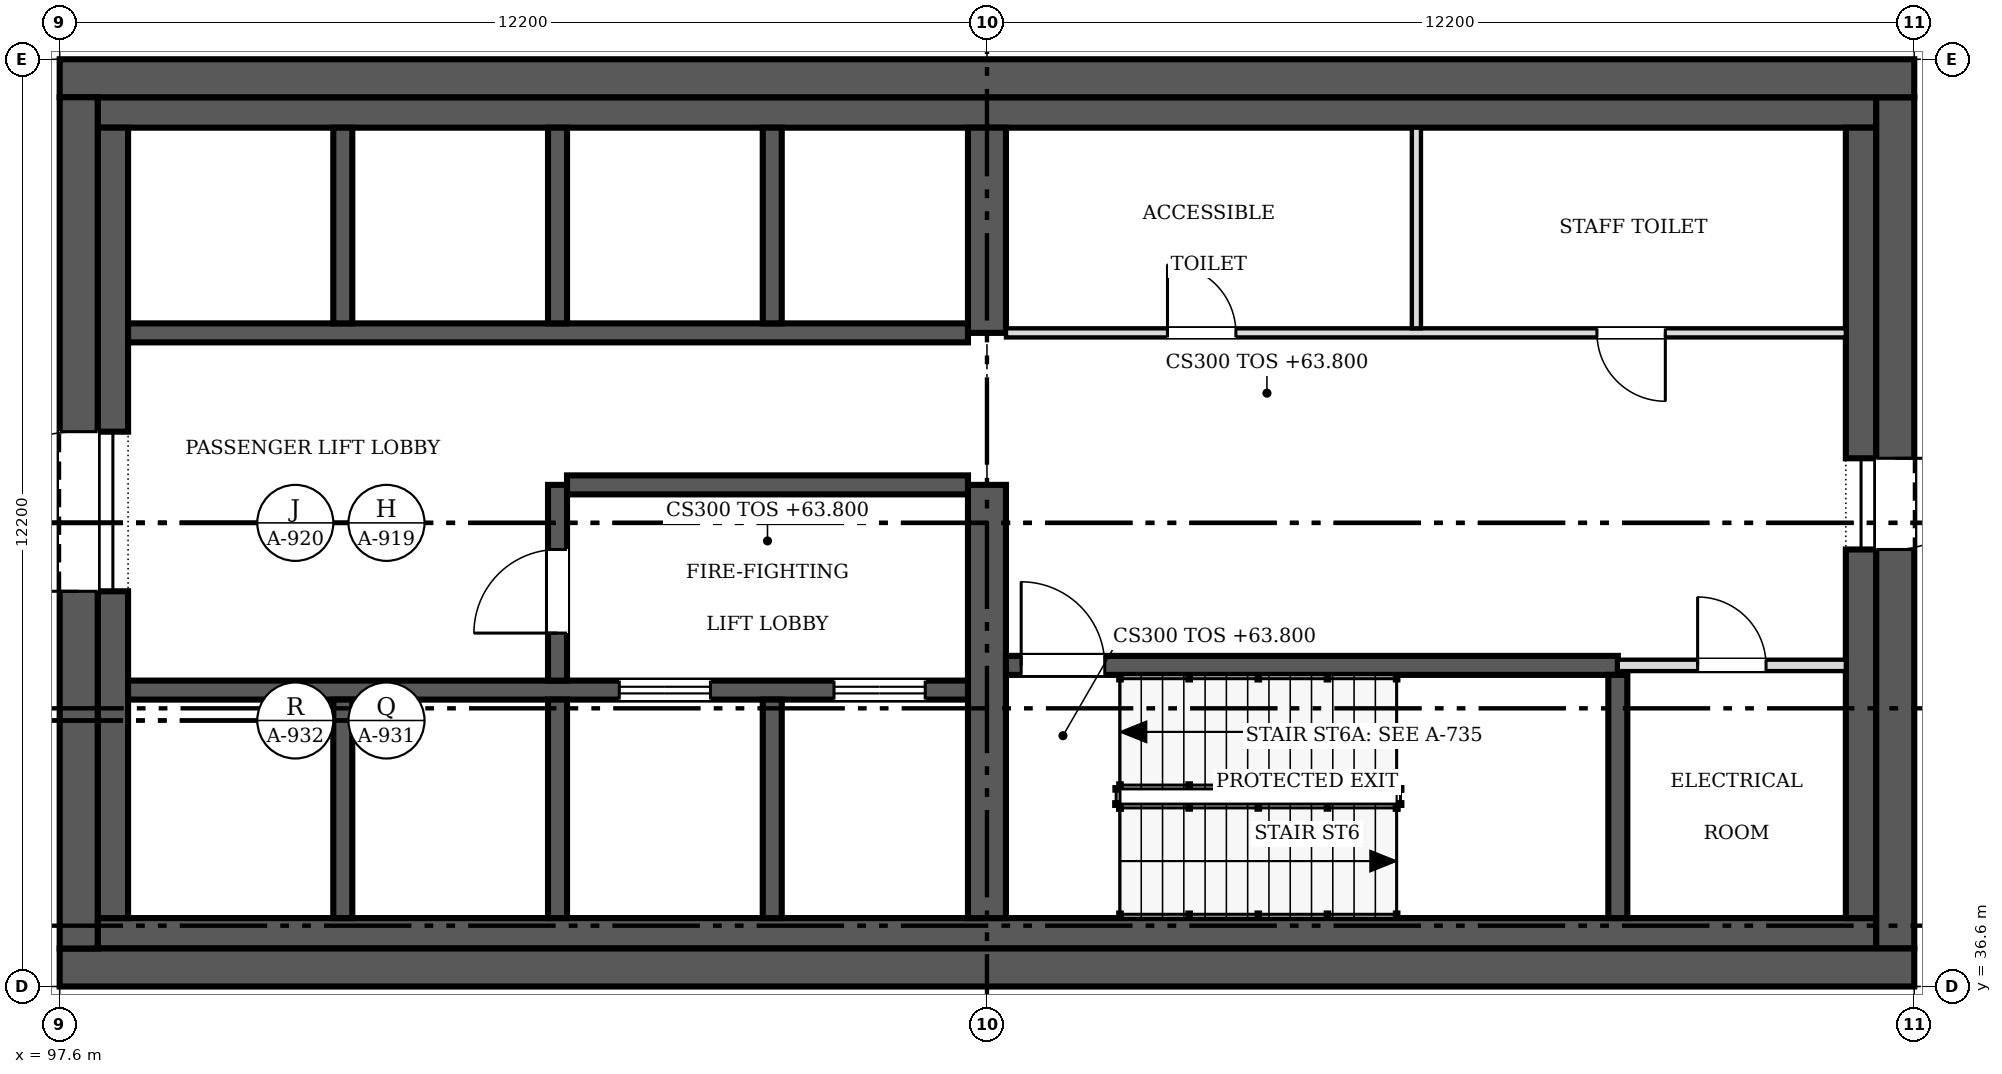
"""IFC4 building model, lengths in metres.
Left out: names, types, materials, properties, quantities, classifications, styles, units other than length and angle.
Written with IfcOpenShell. Run it as: python <this file> out.ifc"""

import sys

from ifc_helpers import new_model, si_unit, direction, frame, frame_2d, origin, place, context, subcontext, project, spatial, rectangle, extrude, source, transform, mapped, element, fill, save


model = new_model("IFC4")
c1 = context("Model", 3, precision=1e-05, world=origin(), true_north=direction((0.0, 1.0)))
c2 = subcontext(c1, "Body", "Model", "MODEL_VIEW")
j1 = project(units=[si_unit("LENGTHUNIT", "METRE"), si_unit("PLANEANGLEUNIT", "RADIAN")], contexts=[c1])
p1 = place(None, origin())
s1 = spatial("IfcSite", under=j1, at=p1, CompositionType="ELEMENT")
p2 = place(p1, origin())
s2 = spatial("IfcBuilding", under=s1, at=p2, CompositionType="ELEMENT")
p3 = place(p2, frame((0.0, 0.0, 63.8)))
s3 = spatial("IfcBuildingStorey", under=s2, at=p3, CompositionType="ELEMENT", Elevation=63.8)
p4 = place(p3, frame((122.0, 36.85, 0.0), z_axis=(0.0, 0.0, 1.0), x_axis=(-1.0, 0.0, 0.0)))
e1 = element("IfcWall", 1, at=p4, inside=s3, PredefinedType="SHEAR", context=c2, shape_type="SweptSolid", body=[
    extrude(rectangle(XDim=24.4, YDim=0.5, at=frame_2d((12.2, 0.0))), origin(), (0.0, 0.0, 1.0), 4.8),
])
p5 = place(p3, frame((97.85, 37.1, 0.0), z_axis=(0.0, 0.0, 1.0), x_axis=(0.0, 1.0, 0.0)))
e2 = element("IfcWall", 2, at=p5, inside=s3, PredefinedType="SHEAR", context=c2, shape_type="SweptSolid", body=[
    extrude(rectangle(XDim=11.2, YDim=0.5, at=frame_2d((5.6, 0.0))), origin(), (0.0, 0.0, 1.0), 4.8),
])
m1 = source(origin(), c2, "Body", "SweptSolid", [
    extrude(rectangle(XDim=2.1, YDim=2.4, at=frame_2d((1.05, 1.2))), frame((0.0, 0.26, 0.0), z_axis=(0.0, -1.0, 0.0), x_axis=(1.0, 0.0, 0.0)), (0.0, 0.0, 1.0), 0.52),
])
p6 = place(p5, frame((4.7, 0.0, 0.0)))
e3 = element("IfcOpeningElement", 3, at=p6, cuts=e2, PredefinedType="OPENING", context=c2, shape_type="MappedRepresentation", body=[
    mapped(m1, transform((0.0, 0.0, 0.0), scale=1.0)),
])
p7 = place(p3, frame((97.6, 48.55, 0.0), z_axis=(0.0, 0.0, 1.0), x_axis=(1.0, 0.0, 0.0)))
e4 = element("IfcWall", 4, at=p7, inside=s3, PredefinedType="SHEAR", context=c2, shape_type="SweptSolid", body=[
    extrude(rectangle(XDim=24.4, YDim=0.5, at=frame_2d((12.2, 0.0))), origin(), (0.0, 0.0, 1.0), 4.8),
])
p8 = place(p3, frame((121.75, 48.3, 0.0), z_axis=(0.0, 0.0, 1.0), x_axis=(0.0, -1.0, 0.0)))
e5 = element("IfcWall", 5, at=p8, inside=s3, PredefinedType="SHEAR", context=c2, shape_type="SweptSolid", body=[
    extrude(rectangle(XDim=11.2, YDim=0.5, at=frame_2d((5.6, 0.0))), origin(), (0.0, 0.0, 1.0), 4.8),
])
m2 = source(origin(), c2, "Body", "SweptSolid", [
    extrude(rectangle(XDim=1.2, YDim=2.1, at=frame_2d((0.6, 1.05))), frame((0.0, 0.26, 0.0), z_axis=(0.0, -1.0, 0.0), x_axis=(1.0, 0.0, 0.0)), (0.0, 0.0, 1.0), 0.52),
])
p9 = place(p8, frame((4.75, 0.0, 0.0)))
e6 = element("IfcOpeningElement", 6, at=p9, cuts=e5, PredefinedType="OPENING", context=c2, shape_type="MappedRepresentation", body=[
    mapped(m2, transform((0.0, 0.0, 0.0), scale=1.0)),
])
for number, where, z_axis, x_axis in (
    (7, (98.1, 37.3, 0.0), (0.0, 0.0, 1.0), (1.0, 0.0, 0.0)),
    (8, (98.1, 48.1, 0.0), (0.0, 0.0, 1.0), (1.0, 0.0, 0.0)),
):
    element("IfcWall", number, at=place(p3, frame(where, z_axis=z_axis, x_axis=x_axis)), inside=s3, PredefinedType="SOLIDWALL", context=c2, shape_type="SweptSolid", body=[
        extrude(rectangle(XDim=23.4, YDim=0.4, at=frame_2d((11.7, 0.0))), origin(), (0.0, 0.0, 1.0), 4.8),
    ])
p10 = place(p3, frame((98.3, 37.5, 0.0), z_axis=(0.0, 0.0, 1.0), x_axis=(0.0, 1.0, 0.0)))
e9 = element("IfcWall", 9, at=p10, inside=s3, PredefinedType="SOLIDWALL", context=c2, shape_type="SweptSolid", body=[
    extrude(rectangle(XDim=4.3, YDim=0.4, at=frame_2d((2.15, 0.0))), origin(), (0.0, 0.0, 1.0), 4.8),
])
p11 = place(p3, frame((98.3, 43.9, 0.0), z_axis=(0.0, 0.0, 1.0), x_axis=(0.0, 1.0, 0.0)))
e10 = element("IfcWall", 10, at=p11, inside=s3, PredefinedType="SOLIDWALL", context=c2, shape_type="SweptSolid", body=[
    extrude(rectangle(XDim=4.0, YDim=0.4, at=frame_2d((2.0, 0.0))), origin(), (0.0, 0.0, 1.0), 4.8),
])
p12 = place(p3, frame((121.3, 37.5, 0.0), z_axis=(0.0, 0.0, 1.0), x_axis=(0.0, 1.0, 0.0)))
e11 = element("IfcWall", 11, at=p12, inside=s3, PredefinedType="SOLIDWALL", context=c2, shape_type="SweptSolid", body=[
    extrude(rectangle(XDim=4.85, YDim=0.4, at=frame_2d((2.425, 0.0))), origin(), (0.0, 0.0, 1.0), 4.8),
])
p13 = place(p3, frame((121.3, 43.55, 0.0), z_axis=(0.0, 0.0, 1.0), x_axis=(0.0, 1.0, 0.0)))
e12 = element("IfcWall", 12, at=p13, inside=s3, PredefinedType="SOLIDWALL", context=c2, shape_type="SweptSolid", body=[
    extrude(rectangle(XDim=4.35, YDim=0.4, at=frame_2d((2.175, 0.0))), origin(), (0.0, 0.0, 1.0), 4.8),
])
p14 = place(p3, frame((109.8, 37.5, 0.0), z_axis=(0.0, 0.0, 1.0), x_axis=(0.0, 1.0, 0.0)))
e13 = element("IfcWall", 13, at=p14, inside=s3, PredefinedType="SHEAR", context=c2, shape_type="SweptSolid", body=[
    extrude(rectangle(XDim=5.7, YDim=0.5, at=frame_2d((2.85, 0.0))), origin(), (0.0, 0.0, 1.0), 4.8),
])
p15 = place(p3, frame((109.8, 45.2, 0.0), z_axis=(0.0, 0.0, 1.0), x_axis=(0.0, 1.0, 0.0)))
e14 = element("IfcWall", 14, at=p15, inside=s3, PredefinedType="SHEAR", context=c2, shape_type="SweptSolid", body=[
    extrude(rectangle(XDim=2.7, YDim=0.5, at=frame_2d((1.35, 0.0))), origin(), (0.0, 0.0, 1.0), 4.8),
])
p16 = place(p3, frame((98.5, 40.5, 0.0), z_axis=(0.0, 0.0, 1.0), x_axis=(1.0, 0.0, 0.0)))
e15 = element("IfcWall", 15, at=p16, inside=s3, PredefinedType="SOLIDWALL", context=c2, shape_type="SweptSolid", body=[
    extrude(rectangle(XDim=11.05, YDim=0.25, at=frame_2d((5.525, 0.0))), origin(), (0.0, 0.0, 1.0), 4.8),
])
m3 = source(origin(), c2, "Body", "SweptSolid", [
    extrude(rectangle(XDim=1.2, YDim=2.1, at=frame_2d((0.6, 1.05))), frame((0.0, 0.135, 0.0), z_axis=(0.0, -1.0, 0.0), x_axis=(1.0, 0.0, 0.0)), (0.0, 0.0, 1.0), 0.27),
])
p17 = place(p16, frame((6.462, 0.0, 0.0)))
e16 = element("IfcOpeningElement", 16, at=p17, cuts=e15, PredefinedType="OPENING", context=c2, shape_type="MappedRepresentation", body=[
    mapped(m3, transform((0.0, 0.0, 0.0), scale=1.0)),
])
p18 = place(p16, frame((9.288, 0.0, 0.0)))
e17 = element("IfcOpeningElement", 17, at=p18, cuts=e15, PredefinedType="OPENING", context=c2, shape_type="MappedRepresentation", body=[
    mapped(m3, transform((0.0, 0.0, 0.0), scale=1.0)),
])
p19 = place(p3, frame((98.5, 45.2, 0.0), z_axis=(0.0, 0.0, 1.0), x_axis=(1.0, 0.0, 0.0)))
e18 = element("IfcWall", 18, at=p19, inside=s3, PredefinedType="SOLIDWALL", context=c2, shape_type="SweptSolid", body=[
    extrude(rectangle(XDim=11.05, YDim=0.25, at=frame_2d((5.525, 0.0))), origin(), (0.0, 0.0, 1.0), 4.8),
])
p20 = place(p3, frame((118.1, 40.825, 0.0), z_axis=(0.0, 0.0, 1.0), x_axis=(-1.0, 0.0, 0.0)))
e19 = element("IfcWall", 19, at=p20, inside=s3, PredefinedType="SOLIDWALL", context=c2, shape_type="SweptSolid", body=[
    extrude(rectangle(XDim=8.05, YDim=0.25, at=frame_2d((4.025, 0.0))), origin(), (0.0, 0.0, 1.0), 4.8),
])
m4 = source(origin(), c2, "Body", "SweptSolid", [
    extrude(rectangle(XDim=1.1, YDim=2.1, at=frame_2d((0.55, 1.05))), frame((0.0, 0.135, 0.0), z_axis=(0.0, -1.0, 0.0), x_axis=(1.0, 0.0, 0.0)), (0.0, 0.0, 1.0), 0.27),
])
p21 = place(p20, frame((6.75, 0.0, 0.0)))
e20 = element("IfcOpeningElement", 20, at=p21, cuts=e19, PredefinedType="OPENING", context=c2, shape_type="MappedRepresentation", body=[
    mapped(m4, transform((0.0, 0.0, 0.0), scale=1.0)),
])
p22 = place(p3, frame((104.15, 37.5, 0.0), z_axis=(0.0, 0.0, 1.0), x_axis=(0.0, 1.0, 0.0)))
e21 = element("IfcWall", 21, at=p22, inside=s3, PredefinedType="SOLIDWALL", context=c2, shape_type="SweptSolid", body=[
    extrude(rectangle(XDim=2.875, YDim=0.25, at=frame_2d((1.438, 0.0))), origin(), (0.0, 0.0, 1.0), 4.8),
])
p23 = place(p3, frame((104.15, 43.2, 0.0), z_axis=(0.0, 0.0, 1.0), x_axis=(0.0, -1.0, 0.0)))
e22 = element("IfcWall", 22, at=p23, inside=s3, PredefinedType="SOLIDWALL", context=c2, shape_type="SweptSolid", body=[
    extrude(rectangle(XDim=2.575, YDim=0.25, at=frame_2d((1.288, 0.0))), origin(), (0.0, 0.0, 1.0), 4.8),
])
p24 = place(p23, frame((0.85, 0.0, 0.0)))
e23 = element("IfcOpeningElement", 23, at=p24, cuts=e22, PredefinedType="OPENING", context=c2, shape_type="MappedRepresentation", body=[
    mapped(m4, transform((0.0, 0.0, 0.0), scale=1.0)),
])
p25 = place(p3, frame((104.275, 43.2, 0.0), z_axis=(0.0, 0.0, 1.0), x_axis=(1.0, 0.0, 0.0)))
e24 = element("IfcWall", 24, at=p25, inside=s3, PredefinedType="SOLIDWALL", context=c2, shape_type="SweptSolid", body=[
    extrude(rectangle(XDim=5.275, YDim=0.25, at=frame_2d((2.638, 0.0))), origin(), (0.0, 0.0, 1.0), 4.8),
])
p26 = place(p3, frame((118.1, 37.5, 0.0), z_axis=(0.0, 0.0, 1.0), x_axis=(0.0, 1.0, 0.0)))
e25 = element("IfcWall", 25, at=p26, inside=s3, PredefinedType="SOLIDWALL", context=c2, shape_type="SweptSolid", body=[
    extrude(rectangle(XDim=3.2, YDim=0.25, at=frame_2d((1.6, 0.0))), origin(), (0.0, 0.0, 1.0), 4.8),
])
for number, where, z_axis, x_axis in (
    (26, (101.325, 37.5, 0.0), (0.0, 0.0, 1.0), (0.0, 1.0, 0.0)),
    (27, (106.975, 37.5, 0.0), (0.0, 0.0, 1.0), (0.0, 1.0, 0.0)),
):
    element("IfcWall", number, at=place(p3, frame(where, z_axis=z_axis, x_axis=x_axis)), inside=s3, PredefinedType="SOLIDWALL", context=c2, shape_type="SweptSolid", body=[
        extrude(rectangle(XDim=2.875, YDim=0.25, at=frame_2d((1.438, 0.0))), origin(), (0.0, 0.0, 1.0), 4.8),
    ])
for number, where, z_axis, x_axis in (
    (28, (101.325, 45.325, 0.0), (0.0, 0.0, 1.0), (0.0, 1.0, 0.0)),
    (29, (104.15, 45.325, 0.0), (0.0, 0.0, 1.0), (0.0, 1.0, 0.0)),
    (30, (106.975, 45.325, 0.0), (0.0, 0.0, 1.0), (0.0, 1.0, 0.0)),
):
    element("IfcWall", number, at=place(p3, frame(where, z_axis=z_axis, x_axis=x_axis)), inside=s3, PredefinedType="SOLIDWALL", context=c2, shape_type="SweptSolid", body=[
        extrude(rectangle(XDim=2.575, YDim=0.25, at=frame_2d((1.288, 0.0))), origin(), (0.0, 0.0, 1.0), 4.8),
    ])
p27 = place(p3, frame((110.05, 45.2, 0.0), z_axis=(0.0, 0.0, 1.0), x_axis=(1.0, 0.0, 0.0)))
e31 = element("IfcWall", 31, at=p27, inside=s3, PredefinedType="PARTITIONING", context=c2, shape_type="SweptSolid", body=[
    extrude(rectangle(XDim=11.05, YDim=0.12, at=frame_2d((5.525, 0.0))), origin(), (0.0, 0.0, 1.0), 4.6),
])
m5 = source(origin(), c2, "Body", "SweptSolid", [
    extrude(rectangle(XDim=0.9, YDim=2.1, at=frame_2d((0.45, 1.05))), frame((0.0, 0.07, 0.0), z_axis=(0.0, -1.0, 0.0), x_axis=(1.0, 0.0, 0.0)), (0.0, 0.0, 1.0), 0.14),
])
p28 = place(p27, frame((2.125, 0.0, 0.0)))
e32 = element("IfcOpeningElement", 32, at=p28, cuts=e31, PredefinedType="OPENING", context=c2, shape_type="MappedRepresentation", body=[
    mapped(m5, transform((0.0, 0.0, 0.0), scale=1.0)),
])
p29 = place(p27, frame((7.775, 0.0, 0.0)))
e33 = element("IfcOpeningElement", 33, at=p29, cuts=e31, PredefinedType="OPENING", context=c2, shape_type="MappedRepresentation", body=[
    mapped(m5, transform((0.0, 0.0, 0.0), scale=1.0)),
])
p30 = place(p3, frame((121.1, 40.825, 0.0), z_axis=(0.0, 0.0, 1.0), x_axis=(-1.0, 0.0, 0.0)))
e34 = element("IfcWall", 34, at=p30, inside=s3, PredefinedType="PARTITIONING", context=c2, shape_type="SweptSolid", body=[
    extrude(rectangle(XDim=3.0, YDim=0.15, at=frame_2d((1.5, 0.0))), origin(), (0.0, 0.0, 1.0), 4.6),
])
m6 = source(origin(), c2, "Body", "SweptSolid", [
    extrude(rectangle(XDim=0.9, YDim=2.1, at=frame_2d((0.45, 1.05))), frame((0.0, 0.085, 0.0), z_axis=(0.0, -1.0, 0.0), x_axis=(1.0, 0.0, 0.0)), (0.0, 0.0, 1.0), 0.17),
])
p31 = place(p30, frame((1.05, 0.0, 0.0)))
e35 = element("IfcOpeningElement", 35, at=p31, cuts=e34, PredefinedType="OPENING", context=c2, shape_type="MappedRepresentation", body=[
    mapped(m6, transform((0.0, 0.0, 0.0), scale=1.0)),
])
p32 = place(p3, frame((115.45, 45.26, 0.0), z_axis=(0.0, 0.0, 1.0), x_axis=(0.0, 1.0, 0.0)))
e36 = element("IfcWall", 36, at=p32, inside=s3, PredefinedType="PARTITIONING", context=c2, shape_type="SweptSolid", body=[
    extrude(rectangle(XDim=2.64, YDim=0.12, at=frame_2d((1.32, 0.0))), origin(), (0.0, 0.0, 1.0), 4.6),
])
m7 = source(origin(), c2, "Body", "SweptSolid", [
    extrude(rectangle(XDim=2.1, YDim=2.4, at=frame_2d((1.05, 1.2))), frame((0.0, 0.025, 0.0), z_axis=(0.0, -1.0, 0.0), x_axis=(1.0, 0.0, 0.0)), (0.0, 0.0, 1.0), 0.05),
])
p33 = place(p6, origin())
e37 = element("IfcDoor", 37, at=p33, inside=s3, OperationType="DOUBLE_DOOR_SINGLE_SWING", PredefinedType="DOOR", context=c2, shape_type="MappedRepresentation", body=[
    mapped(m7, transform((0.0, 0.0, 0.0), scale=1.0)),
])
fill(e3, e37)
m8 = source(origin(), c2, "Body", "SweptSolid", [
    extrude(rectangle(XDim=1.2, YDim=2.1, at=frame_2d((0.6, 1.05))), frame((0.0, 0.025, 0.0), z_axis=(0.0, -1.0, 0.0), x_axis=(1.0, 0.0, 0.0)), (0.0, 0.0, 1.0), 0.05),
])
p34 = place(p9, origin())
e38 = element("IfcDoor", 38, at=p34, inside=s3, OperationType="SINGLE_SWING_LEFT", PredefinedType="DOOR", context=c2, shape_type="MappedRepresentation", body=[
    mapped(m8, transform((0.0, 0.0, 0.0), scale=1.0)),
])
fill(e6, e38)
p35 = place(p17, origin())
e39 = element("IfcDoor", 39, at=p35, inside=s3, OperationType="DOUBLE_DOOR_SLIDING", PredefinedType="DOOR", context=c2, shape_type="MappedRepresentation", body=[
    mapped(m8, transform((0.0, 0.0, 0.0), scale=1.0)),
])
fill(e16, e39)
p36 = place(p18, origin())
e40 = element("IfcDoor", 40, at=p36, inside=s3, OperationType="DOUBLE_DOOR_SLIDING", PredefinedType="DOOR", context=c2, shape_type="MappedRepresentation", body=[
    mapped(m8, transform((0.0, 0.0, 0.0), scale=1.0)),
])
fill(e17, e40)
m9 = source(origin(), c2, "Body", "SweptSolid", [
    extrude(rectangle(XDim=1.1, YDim=2.1, at=frame_2d((0.55, 1.05))), frame((0.0, 0.025, 0.0), z_axis=(0.0, -1.0, 0.0), x_axis=(1.0, 0.0, 0.0)), (0.0, 0.0, 1.0), 0.05),
])
p37 = place(p21, origin())
e41 = element("IfcDoor", 41, at=p37, inside=s3, OperationType="SINGLE_SWING_RIGHT", PredefinedType="DOOR", context=c2, shape_type="MappedRepresentation", body=[
    mapped(m9, transform((0.0, 0.0, 0.0), scale=1.0)),
])
fill(e20, e41)
p38 = place(p24, origin())
e42 = element("IfcDoor", 42, at=p38, inside=s3, OperationType="SINGLE_SWING_RIGHT", PredefinedType="DOOR", context=c2, shape_type="MappedRepresentation", body=[
    mapped(m9, transform((0.0, 0.0, 0.0), scale=1.0)),
])
fill(e23, e42)
m10 = source(origin(), c2, "Body", "SweptSolid", [
    extrude(rectangle(XDim=0.9, YDim=2.1, at=frame_2d((0.45, 1.05))), frame((0.0, 0.025, 0.0), z_axis=(0.0, -1.0, 0.0), x_axis=(1.0, 0.0, 0.0)), (0.0, 0.0, 1.0), 0.05),
])
p39 = place(p28, origin())
e43 = element("IfcDoor", 43, at=p39, inside=s3, OperationType="SINGLE_SWING_LEFT", PredefinedType="DOOR", context=c2, shape_type="MappedRepresentation", body=[
    mapped(m10, transform((0.0, 0.0, 0.0), scale=1.0)),
])
fill(e32, e43)
p40 = place(p29, origin())
e44 = element("IfcDoor", 44, at=p40, inside=s3, OperationType="SINGLE_SWING_RIGHT", PredefinedType="DOOR", context=c2, shape_type="MappedRepresentation", body=[
    mapped(m10, transform((0.0, 0.0, 0.0), scale=1.0)),
])
fill(e33, e44)
p41 = place(p31, origin())
e45 = element("IfcDoor", 45, at=p41, inside=s3, OperationType="SINGLE_SWING_RIGHT", PredefinedType="DOOR", context=c2, shape_type="MappedRepresentation", body=[
    mapped(m10, transform((0.0, 0.0, 0.0), scale=1.0)),
])
fill(e35, e45)
save(model, sys.argv[1])
